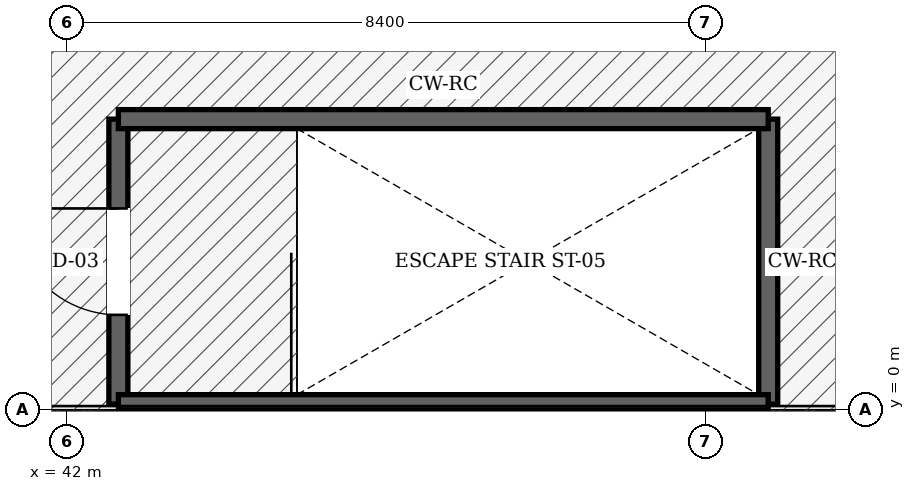
"""IFC4 building model, lengths in metres.
Left out: names, types, materials, properties, quantities, classifications, styles, units other than length and angle.
Written with IfcOpenShell. Run it as: python <this file> out.ifc"""

import sys

from ifc_helpers import new_model, si_unit, direction, frame, frame_2d, origin, place, context, subcontext, project, spatial, rectangle, extrude, element, fill, save


model = new_model("IFC4")
c1 = context("Model", 3, precision=1e-05, world=origin(), true_north=direction((0.0, 1.0)))
c2 = subcontext(c1, "Body", "Model", "MODEL_VIEW")
j1 = project(units=[si_unit("LENGTHUNIT", "METRE"), si_unit("PLANEANGLEUNIT", "RADIAN")], contexts=[c1])
p1 = place(None, origin())
s1 = spatial("IfcSite", under=j1, at=p1, CompositionType="ELEMENT")
p2 = place(p1, origin())
s2 = spatial("IfcBuilding", under=s1, at=p2, CompositionType="ELEMENT")
p3 = place(p2, frame((0.0, 0.0, 10.2)))
s3 = spatial("IfcBuildingStorey", under=s2, at=p3, CompositionType="ELEMENT", Elevation=10.2)
p4 = place(p3, frame((42.675, 0.075, 0.0), z_axis=(0.0, 0.0, 1.0), x_axis=(0.0, 1.0, 0.0)))
e1 = element("IfcWall", 1, at=p4, inside=s3, PredefinedType="SHEAR", context=c2, shape_type="SweptSolid", body=[
    extrude(rectangle(XDim=3.75, YDim=0.25, at=frame_2d((1.875, 0.0))), origin(), (0.0, 0.0, 1.0), 4.56),
])
p5 = place(p4, frame((1.175, 0.0, 0.0)))
e2 = element("IfcOpeningElement", 2, at=p5, cuts=e1, PredefinedType="OPENING", context=c2, shape_type="SweptSolid", body=[
    extrude(rectangle(XDim=1.4, YDim=2.25, at=frame_2d((0.7, 1.125))), frame((0.0, 0.135, 0.0), z_axis=(0.0, -1.0, 0.0), x_axis=(1.0, 0.0, 0.0)), (0.0, 0.0, 1.0), 0.27),
])
p6 = place(p3, frame((51.225, 3.825, 0.0), z_axis=(0.0, 0.0, 1.0), x_axis=(0.0, -1.0, 0.0)))
e3 = element("IfcWall", 3, at=p6, inside=s3, PredefinedType="SHEAR", context=c2, shape_type="SweptSolid", body=[
    extrude(rectangle(XDim=3.75, YDim=0.25, at=frame_2d((1.875, 0.0))), origin(), (0.0, 0.0, 1.0), 4.56),
])
for number, where, z_axis, x_axis in (
    (4, (51.225, 0.075, 0.0), (0.0, 0.0, 1.0), (-1.0, 0.0, 0.0)),
    (5, (42.675, 3.825, 0.0), (0.0, 0.0, 1.0), (1.0, 0.0, 0.0)),
):
    element("IfcWall", number, at=place(p3, frame(where, z_axis=z_axis, x_axis=x_axis)), inside=s3, PredefinedType="SHEAR", context=c2, shape_type="SweptSolid", body=[
        extrude(rectangle(XDim=8.55, YDim=0.25, at=frame_2d((4.275, 0.0))), origin(), (0.0, 0.0, 1.0), 4.56),
    ])
p7 = place(p5, origin())
e6 = element("IfcDoor", 6, at=p7, inside=s3, OperationType="SINGLE_SWING_RIGHT", PredefinedType="DOOR", context=c2, shape_type="SweptSolid", body=[
    extrude(rectangle(XDim=1.4, YDim=2.25, at=frame_2d((0.7, 1.125))), frame((0.0, 0.025, 0.0), z_axis=(0.0, -1.0, 0.0), x_axis=(1.0, 0.0, 0.0)), (0.0, 0.0, 1.0), 0.05),
])
fill(e2, e6)
save(model, sys.argv[1])
